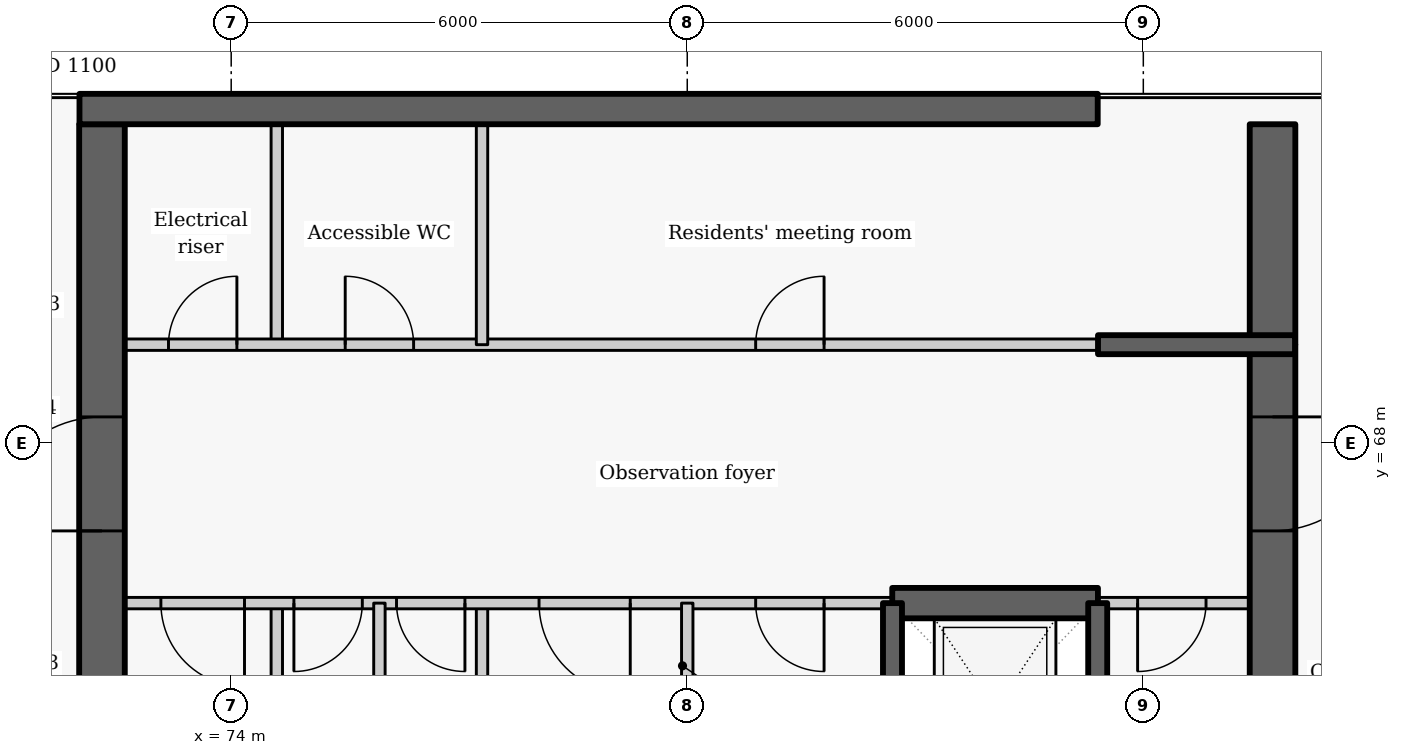
"""IFC4 building model, lengths in metres.
Left out: names, types, materials, properties, quantities, classifications, styles, units other than length and angle.
Written with IfcOpenShell. Run it as: python <this file> out.ifc"""

import sys

from ifc_helpers import new_model, si_unit, direction, frame, frame_2d, origin, place, context, subcontext, project, spatial, rectangle, extrude, element, fill, save


model = new_model("IFC4")
c1 = context("Model", 3, precision=1e-05, world=origin(), true_north=direction((0.0, 1.0)))
c2 = subcontext(c1, "Body", "Model", "MODEL_VIEW")
j1 = project(units=[si_unit("LENGTHUNIT", "METRE"), si_unit("PLANEANGLEUNIT", "RADIAN")], contexts=[c1])
p1 = place(None, origin())
s1 = spatial("IfcSite", under=j1, at=p1, CompositionType="ELEMENT")
p2 = place(p1, origin())
s2 = spatial("IfcBuilding", under=s1, at=p2, CompositionType="ELEMENT")
p3 = place(p2, frame((0.0, 0.0, 283.2)))
s3 = spatial("IfcBuildingStorey", under=s2, at=p3, CompositionType="ELEMENT", Elevation=283.2)
p4 = place(p3, frame((74.6, 63.1, 0.0), z_axis=(0.0, 0.0, 1.0), x_axis=(0.0, 1.0, 0.0)))
e1 = element("IfcWall", 1, at=p4, inside=s3, PredefinedType="PARTITIONING", context=c2, shape_type="SweptSolid", body=[
    extrude(rectangle(XDim=2.8, YDim=0.15, at=frame_2d((1.4, 0.0))), origin(), (0.0, 0.0, 1.0), 3.325),
])
p5 = place(p3, frame((74.6, 69.3, 0.0), z_axis=(0.0, 0.0, 1.0), x_axis=(0.0, 1.0, 0.0)))
e2 = element("IfcWall", 2, at=p5, inside=s3, PredefinedType="PARTITIONING", context=c2, shape_type="SweptSolid", body=[
    extrude(rectangle(XDim=2.9, YDim=0.15, at=frame_2d((1.45, 0.0))), origin(), (0.0, 0.0, 1.0), 3.325),
])
p6 = place(p3, frame((72.0, 69.3, 0.0), z_axis=(0.0, 0.0, 1.0), x_axis=(1.0, 0.0, 0.0)))
e3 = element("IfcWall", 3, at=p6, inside=s3, PredefinedType="PARTITIONING", context=c2, shape_type="SweptSolid", body=[
    extrude(rectangle(XDim=13.4, YDim=0.15, at=frame_2d((6.7, 0.0))), origin(), (0.0, 0.0, 1.0), 3.325),
])
p7 = place(p6, frame((1.175, 0.0, 0.0)))
e4 = element("IfcOpeningElement", 4, at=p7, cuts=e3, PredefinedType="OPENING", context=c2, shape_type="SweptSolid", body=[
    extrude(rectangle(XDim=0.9, YDim=2.1, at=frame_2d((0.45, 1.05))), frame((0.0, 0.085, 0.0), z_axis=(0.0, -1.0, 0.0), x_axis=(1.0, 0.0, 0.0)), (0.0, 0.0, 1.0), 0.17),
])
p8 = place(p6, frame((3.5, 0.0, 0.0)))
e5 = element("IfcOpeningElement", 5, at=p8, cuts=e3, PredefinedType="OPENING", context=c2, shape_type="SweptSolid", body=[
    extrude(rectangle(XDim=0.9, YDim=2.1, at=frame_2d((0.45, 1.05))), frame((0.0, 0.085, 0.0), z_axis=(0.0, -1.0, 0.0), x_axis=(1.0, 0.0, 0.0)), (0.0, 0.0, 1.0), 0.17),
])
p9 = place(p6, frame((8.9, 0.0, 0.0)))
e6 = element("IfcOpeningElement", 6, at=p9, cuts=e3, PredefinedType="OPENING", context=c2, shape_type="SweptSolid", body=[
    extrude(rectangle(XDim=0.9, YDim=2.1, at=frame_2d((0.45, 1.05))), frame((0.0, 0.085, 0.0), z_axis=(0.0, -1.0, 0.0), x_axis=(1.0, 0.0, 0.0)), (0.0, 0.0, 1.0), 0.17),
])
p10 = place(p3, frame((72.3, 63.1, -0.275), z_axis=(0.0, 0.0, 1.0), x_axis=(0.0, 1.0, 0.0)))
e7 = element("IfcWall", 7, at=p10, inside=s3, PredefinedType="SHEAR", context=c2, shape_type="SweptSolid", body=[
    extrude(rectangle(XDim=9.1, YDim=0.6, at=frame_2d((4.55, 0.0))), origin(), (0.0, 0.0, 1.0), 3.6),
])
p11 = place(p10, frame((3.75, 0.0, 0.275)))
e8 = element("IfcOpeningElement", 8, at=p11, cuts=e7, PredefinedType="OPENING", context=c2, shape_type="SweptSolid", body=[
    extrude(rectangle(XDim=1.5, YDim=2.1, at=frame_2d((0.75, 1.05))), frame((0.0, 0.31, 0.0), z_axis=(0.0, -1.0, 0.0), x_axis=(1.0, 0.0, 0.0)), (0.0, 0.0, 1.0), 0.62),
])
p12 = place(p3, frame((77.3, 63.1, 0.0), z_axis=(0.0, 0.0, 1.0), x_axis=(0.0, 1.0, 0.0)))
e9 = element("IfcWall", 9, at=p12, inside=s3, PredefinedType="PARTITIONING", context=c2, shape_type="SweptSolid", body=[
    extrude(rectangle(XDim=2.8, YDim=0.15, at=frame_2d((1.4, 0.0))), origin(), (0.0, 0.0, 1.0), 3.325),
])
p13 = place(p3, frame((77.3, 69.3, 0.0), z_axis=(0.0, 0.0, 1.0), x_axis=(0.0, 1.0, 0.0)))
e10 = element("IfcWall", 10, at=p13, inside=s3, PredefinedType="PARTITIONING", context=c2, shape_type="SweptSolid", body=[
    extrude(rectangle(XDim=2.9, YDim=0.15, at=frame_2d((1.45, 0.0))), origin(), (0.0, 0.0, 1.0), 3.325),
])
p14 = place(p3, frame((82.703, 65.9, 0.0), z_axis=(0.0, 0.0, 1.0), x_axis=(-1.0, 0.0, 0.0)))
e11 = element("IfcWall", 11, at=p14, inside=s3, PredefinedType="PARTITIONING", context=c2, shape_type="SweptSolid", body=[
    extrude(rectangle(XDim=10.703, YDim=0.15, at=frame_2d((5.352, 0.0))), origin(), (0.0, 0.0, 1.0), 3.325),
])
p15 = place(p14, frame((8.528, 0.0, 0.0)))
e12 = element("IfcOpeningElement", 12, at=p15, cuts=e11, PredefinedType="OPENING", context=c2, shape_type="SweptSolid", body=[
    extrude(rectangle(XDim=1.1, YDim=2.1, at=frame_2d((0.55, 1.05))), frame((0.0, 0.085, 0.0), z_axis=(0.0, -1.0, 0.0), x_axis=(1.0, 0.0, 0.0)), (0.0, 0.0, 1.0), 0.17),
])
p16 = place(p14, frame((6.978, 0.0, 0.0)))
e13 = element("IfcOpeningElement", 13, at=p16, cuts=e11, PredefinedType="OPENING", context=c2, shape_type="SweptSolid", body=[
    extrude(rectangle(XDim=0.9, YDim=2.1, at=frame_2d((0.45, 1.05))), frame((0.0, 0.085, 0.0), z_axis=(0.0, -1.0, 0.0), x_axis=(1.0, 0.0, 0.0)), (0.0, 0.0, 1.0), 0.17),
])
p17 = place(p14, frame((5.628, 0.0, 0.0)))
e14 = element("IfcOpeningElement", 14, at=p17, cuts=e11, PredefinedType="OPENING", context=c2, shape_type="SweptSolid", body=[
    extrude(rectangle(XDim=0.9, YDim=2.1, at=frame_2d((0.45, 1.05))), frame((0.0, 0.085, 0.0), z_axis=(0.0, -1.0, 0.0), x_axis=(1.0, 0.0, 0.0)), (0.0, 0.0, 1.0), 0.17),
])
p18 = place(p14, frame((3.453, 0.0, 0.0)))
e15 = element("IfcOpeningElement", 15, at=p18, cuts=e11, PredefinedType="OPENING", context=c2, shape_type="SweptSolid", body=[
    extrude(rectangle(XDim=1.2, YDim=2.1, at=frame_2d((0.6, 1.05))), frame((0.0, 0.085, 0.0), z_axis=(0.0, -1.0, 0.0), x_axis=(1.0, 0.0, 0.0)), (0.0, 0.0, 1.0), 0.17),
])
p19 = place(p14, frame((0.903, 0.0, 0.0)))
e16 = element("IfcOpeningElement", 16, at=p19, cuts=e11, PredefinedType="OPENING", context=c2, shape_type="SweptSolid", body=[
    extrude(rectangle(XDim=0.9, YDim=2.1, at=frame_2d((0.45, 1.05))), frame((0.0, 0.085, 0.0), z_axis=(0.0, -1.0, 0.0), x_axis=(1.0, 0.0, 0.0)), (0.0, 0.0, 1.0), 0.17),
])
p20 = place(p3, frame((88.0, 65.9, 0.0), z_axis=(0.0, 0.0, 1.0), x_axis=(-1.0, 0.0, 0.0)))
e17 = element("IfcWall", 17, at=p20, inside=s3, PredefinedType="PARTITIONING", context=c2, shape_type="SweptSolid", body=[
    extrude(rectangle(XDim=2.603, YDim=0.15, at=frame_2d((1.302, 0.0))), origin(), (0.0, 0.0, 1.0), 3.325),
])
p21 = place(p20, frame((1.175, 0.0, 0.0)))
e18 = element("IfcOpeningElement", 18, at=p21, cuts=e17, PredefinedType="OPENING", context=c2, shape_type="SweptSolid", body=[
    extrude(rectangle(XDim=0.9, YDim=2.1, at=frame_2d((0.45, 1.05))), frame((0.0, 0.085, 0.0), z_axis=(0.0, -1.0, 0.0), x_axis=(1.0, 0.0, 0.0)), (0.0, 0.0, 1.0), 0.17),
])
p22 = place(p3, frame((82.697, 65.9, -0.275), z_axis=(0.0, 0.0, 1.0), x_axis=(1.0, 0.0, 0.0)))
e19 = element("IfcWall", 19, at=p22, inside=s3, PredefinedType="SHEAR", context=c2, shape_type="SweptSolid", body=[
    extrude(rectangle(XDim=2.706, YDim=0.4, at=frame_2d((1.353, 0.0))), origin(), (0.0, 0.0, 1.0), 3.6),
])
p23 = place(p3, frame((87.7, 69.3, -0.275), z_axis=(0.0, 0.0, 1.0), x_axis=(0.0, -1.0, 0.0)))
e20 = element("IfcWall", 20, at=p23, inside=s3, PredefinedType="SHEAR", context=c2, shape_type="SweptSolid", body=[
    extrude(rectangle(XDim=11.35, YDim=0.6, at=frame_2d((5.675, 0.0))), origin(), (0.0, 0.0, 1.0), 3.6),
])
p24 = place(p23, frame((0.95, 0.0, 0.275)))
e21 = element("IfcOpeningElement", 21, at=p24, cuts=e20, PredefinedType="OPENING", context=c2, shape_type="SweptSolid", body=[
    extrude(rectangle(XDim=1.5, YDim=2.1, at=frame_2d((0.75, 1.05))), frame((0.0, 0.31, 0.0), z_axis=(0.0, -1.0, 0.0), x_axis=(1.0, 0.0, 0.0)), (0.0, 0.0, 1.0), 0.62),
])
p25 = place(p23, frame((8.225, 0.0, 0.275)))
e22 = element("IfcOpeningElement", 22, at=p25, cuts=e20, PredefinedType="OPENING", context=c2, shape_type="SweptSolid", body=[
    extrude(rectangle(XDim=1.1, YDim=2.1, at=frame_2d((0.55, 1.05))), frame((0.0, 0.31, 0.0), z_axis=(0.0, -1.0, 0.0), x_axis=(1.0, 0.0, 0.0)), (0.0, 0.0, 1.0), 0.62),
])
for number, where, z_axis, x_axis in (
    (23, (75.95, 63.1, 0.0), (0.0, 0.0, 1.0), (0.0, 1.0, 0.0)),
    (24, (80.0, 63.1, 0.0), (0.0, 0.0, 1.0), (0.0, 1.0, 0.0)),
):
    element("IfcWall", number, at=place(p3, frame(where, z_axis=z_axis, x_axis=x_axis)), inside=s3, PredefinedType="PARTITIONING", context=c2, shape_type="SweptSolid", body=[
        extrude(rectangle(XDim=2.8, YDim=0.15, at=frame_2d((1.4, 0.0))), origin(), (0.0, 0.0, 1.0), 3.325),
    ])
for number, where, z_axis, x_axis in (
    (25, (82.7, 63.1, -0.275), (0.0, 0.0, 1.0), (0.0, 1.0, 0.0)),
    (26, (85.4, 63.1, -0.275), (0.0, 0.0, 1.0), (0.0, 1.0, 0.0)),
):
    element("IfcWall", number, at=place(p3, frame(where, z_axis=z_axis, x_axis=x_axis)), inside=s3, PredefinedType="SHEAR", context=c2, shape_type="SweptSolid", body=[
        extrude(rectangle(XDim=2.8, YDim=0.25, at=frame_2d((1.4, 0.0))), origin(), (0.0, 0.0, 1.0), 3.6),
    ])
p26 = place(p3, frame((72.004, 72.4, -0.275), z_axis=(0.0, 0.0, 1.0), x_axis=(1.0, 0.0, 0.0)))
e27 = element("IfcWall", 27, at=p26, inside=s3, PredefinedType="SHEAR", context=c2, shape_type="SweptSolid", body=[
    extrude(rectangle(XDim=13.396, YDim=0.4, at=frame_2d((6.698, 0.0))), origin(), (0.0, 0.0, 1.0), 3.6),
])
p27 = place(p3, frame((87.7, 69.304, -0.275), z_axis=(0.0, 0.0, 1.0), x_axis=(0.0, 1.0, 0.0)))
e28 = element("IfcWall", 28, at=p27, inside=s3, PredefinedType="SHEAR", context=c2, shape_type="SweptSolid", body=[
    extrude(rectangle(XDim=2.896, YDim=0.6, at=frame_2d((1.448, 0.0))), origin(), (0.0, 0.0, 1.0), 3.6),
])
p28 = place(p3, frame((85.404, 69.3, -0.275), z_axis=(0.0, 0.0, 1.0), x_axis=(1.0, 0.0, 0.0)))
e29 = element("IfcWall", 29, at=p28, inside=s3, PredefinedType="SHEAR", context=c2, shape_type="SweptSolid", body=[
    extrude(rectangle(XDim=2.592, YDim=0.25, at=frame_2d((1.296, 0.0))), origin(), (0.0, 0.0, 1.0), 3.6),
])
p29 = place(p7, origin())
e30 = element("IfcDoor", 30, at=p29, inside=s3, OperationType="SINGLE_SWING_RIGHT", PredefinedType="DOOR", context=c2, shape_type="SweptSolid", body=[
    extrude(rectangle(XDim=0.9, YDim=2.1, at=frame_2d((0.45, 1.05))), frame((0.0, 0.025, 0.0), z_axis=(0.0, -1.0, 0.0), x_axis=(1.0, 0.0, 0.0)), (0.0, 0.0, 1.0), 0.05),
])
fill(e4, e30)
p30 = place(p8, origin())
e31 = element("IfcDoor", 31, at=p30, inside=s3, OperationType="SINGLE_SWING_LEFT", PredefinedType="DOOR", context=c2, shape_type="SweptSolid", body=[
    extrude(rectangle(XDim=0.9, YDim=2.1, at=frame_2d((0.45, 1.05))), frame((0.0, 0.025, 0.0), z_axis=(0.0, -1.0, 0.0), x_axis=(1.0, 0.0, 0.0)), (0.0, 0.0, 1.0), 0.05),
])
fill(e5, e31)
p31 = place(p9, origin())
e32 = element("IfcDoor", 32, at=p31, inside=s3, OperationType="SINGLE_SWING_RIGHT", PredefinedType="DOOR", context=c2, shape_type="SweptSolid", body=[
    extrude(rectangle(XDim=0.9, YDim=2.1, at=frame_2d((0.45, 1.05))), frame((0.0, 0.025, 0.0), z_axis=(0.0, -1.0, 0.0), x_axis=(1.0, 0.0, 0.0)), (0.0, 0.0, 1.0), 0.05),
])
fill(e6, e32)
p32 = place(p15, origin())
e33 = element("IfcDoor", 33, at=p32, inside=s3, OperationType="SINGLE_SWING_LEFT", PredefinedType="DOOR", context=c2, shape_type="SweptSolid", body=[
    extrude(rectangle(XDim=1.1, YDim=2.1, at=frame_2d((0.55, 1.05))), frame((0.0, 0.025, 0.0), z_axis=(0.0, -1.0, 0.0), x_axis=(1.0, 0.0, 0.0)), (0.0, 0.0, 1.0), 0.05),
])
fill(e12, e33)
p33 = place(p16, origin())
e34 = element("IfcDoor", 34, at=p33, inside=s3, OperationType="SINGLE_SWING_RIGHT", PredefinedType="DOOR", context=c2, shape_type="SweptSolid", body=[
    extrude(rectangle(XDim=0.9, YDim=2.1, at=frame_2d((0.45, 1.05))), frame((0.0, 0.025, 0.0), z_axis=(0.0, -1.0, 0.0), x_axis=(1.0, 0.0, 0.0)), (0.0, 0.0, 1.0), 0.05),
])
fill(e13, e34)
p34 = place(p17, origin())
e35 = element("IfcDoor", 35, at=p34, inside=s3, OperationType="SINGLE_SWING_LEFT", PredefinedType="DOOR", context=c2, shape_type="SweptSolid", body=[
    extrude(rectangle(XDim=0.9, YDim=2.1, at=frame_2d((0.45, 1.05))), frame((0.0, 0.025, 0.0), z_axis=(0.0, -1.0, 0.0), x_axis=(1.0, 0.0, 0.0)), (0.0, 0.0, 1.0), 0.05),
])
fill(e14, e35)
p35 = place(p18, origin())
e36 = element("IfcDoor", 36, at=p35, inside=s3, OperationType="DOUBLE_DOOR_SINGLE_SWING", PredefinedType="DOOR", context=c2, shape_type="SweptSolid", body=[
    extrude(rectangle(XDim=1.2, YDim=2.1, at=frame_2d((0.6, 1.05))), frame((0.0, 0.025, 0.0), z_axis=(0.0, -1.0, 0.0), x_axis=(1.0, 0.0, 0.0)), (0.0, 0.0, 1.0), 0.05),
])
fill(e15, e36)
p36 = place(p19, origin())
e37 = element("IfcDoor", 37, at=p36, inside=s3, OperationType="SINGLE_SWING_LEFT", PredefinedType="DOOR", context=c2, shape_type="SweptSolid", body=[
    extrude(rectangle(XDim=0.9, YDim=2.1, at=frame_2d((0.45, 1.05))), frame((0.0, 0.025, 0.0), z_axis=(0.0, -1.0, 0.0), x_axis=(1.0, 0.0, 0.0)), (0.0, 0.0, 1.0), 0.05),
])
fill(e16, e37)
p37 = place(p21, origin())
e38 = element("IfcDoor", 38, at=p37, inside=s3, OperationType="SINGLE_SWING_RIGHT", PredefinedType="DOOR", context=c2, shape_type="SweptSolid", body=[
    extrude(rectangle(XDim=0.9, YDim=2.1, at=frame_2d((0.45, 1.05))), frame((0.0, 0.025, 0.0), z_axis=(0.0, -1.0, 0.0), x_axis=(1.0, 0.0, 0.0)), (0.0, 0.0, 1.0), 0.05),
])
fill(e18, e38)
p38 = place(p24, origin())
e39 = element("IfcDoor", 39, at=p38, inside=s3, OperationType="DOUBLE_DOOR_SINGLE_SWING", PredefinedType="DOOR", context=c2, shape_type="SweptSolid", body=[
    extrude(rectangle(XDim=1.5, YDim=2.1, at=frame_2d((0.75, 1.05))), frame((0.0, 0.025, 0.0), z_axis=(0.0, -1.0, 0.0), x_axis=(1.0, 0.0, 0.0)), (0.0, 0.0, 1.0), 0.05),
])
fill(e21, e39)
p39 = place(p11, origin())
e40 = element("IfcDoor", 40, at=p39, inside=s3, OperationType="DOUBLE_DOOR_SINGLE_SWING", PredefinedType="DOOR", context=c2, shape_type="SweptSolid", body=[
    extrude(rectangle(XDim=1.5, YDim=2.1, at=frame_2d((0.75, 1.05))), frame((0.0, 0.025, 0.0), z_axis=(0.0, -1.0, 0.0), x_axis=(1.0, 0.0, 0.0)), (0.0, 0.0, 1.0), 0.05),
])
fill(e8, e40)
save(model, sys.argv[1])
